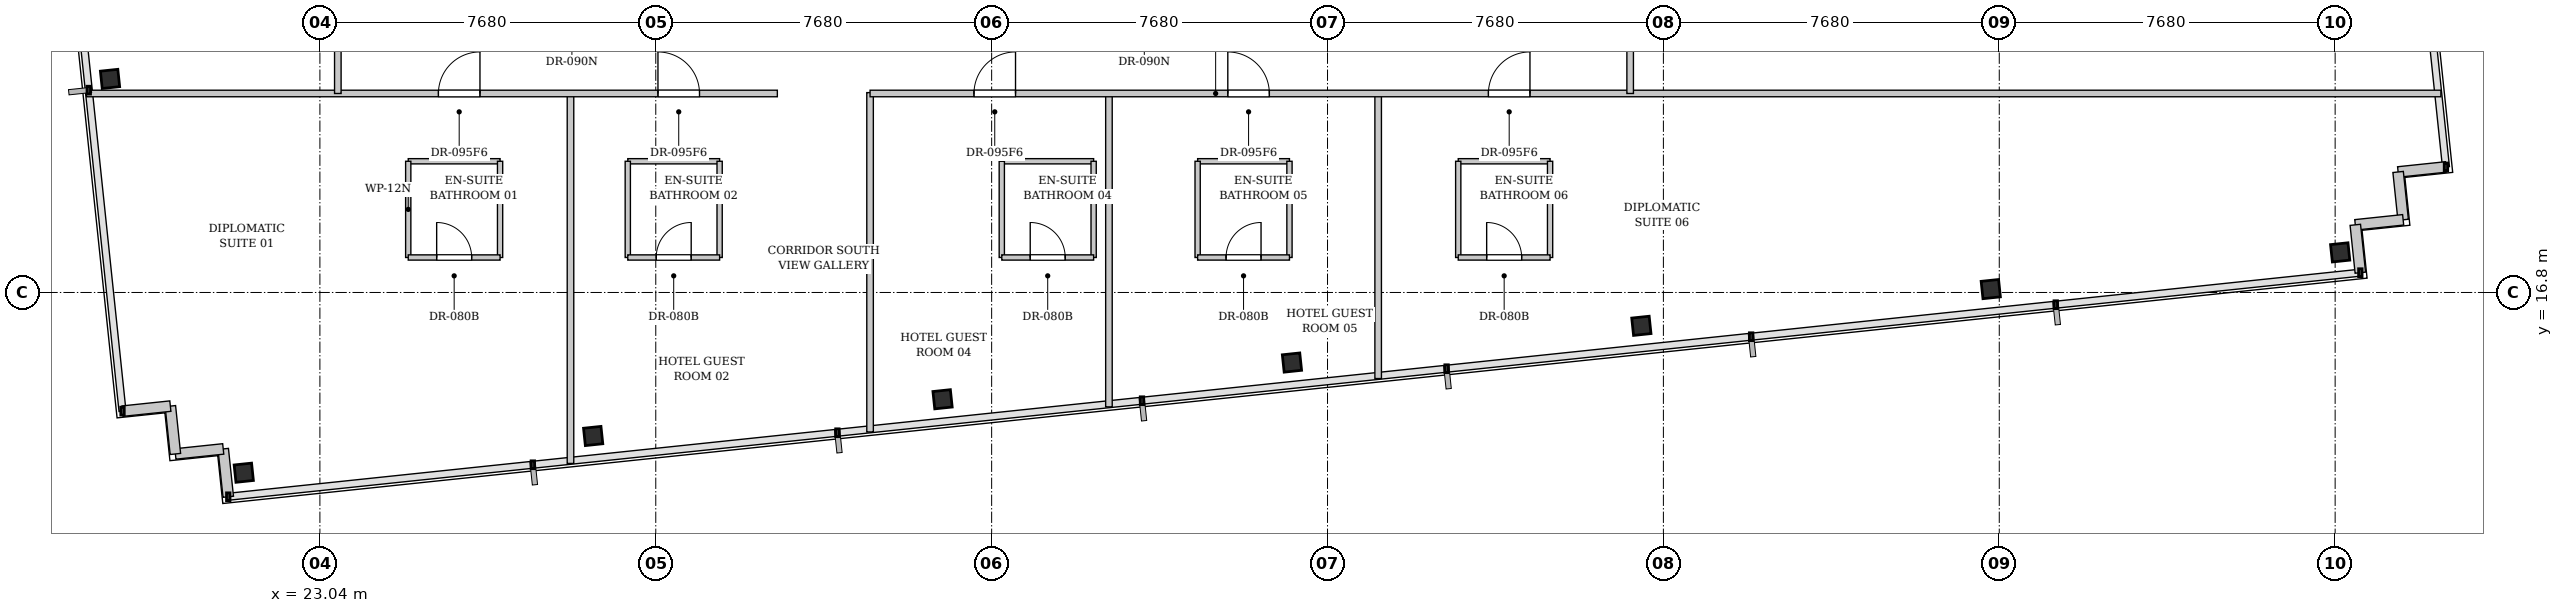
"""IFC4 building model, lengths in metres.
Left out: names, types, materials, properties, quantities, classifications, styles, units other than length and angle.
Written with IfcOpenShell. Run it as: python <this file> out.ifc"""

import sys

from ifc_helpers import new_model, si_unit, direction, frame, frame_2d, origin, origin_2d, place, context, subcontext, project, spatial, rectangle, i_section, extrude, element, fill, save


model = new_model("IFC4")
c1 = context("Model", 3, precision=1e-05, world=origin(), true_north=direction((0.0, 1.0)))
c2 = subcontext(c1, "Body", "Model", "MODEL_VIEW")
j1 = project(units=[si_unit("LENGTHUNIT", "METRE"), si_unit("PLANEANGLEUNIT", "RADIAN")], contexts=[c1])
p1 = place(None, origin())
s1 = spatial("IfcSite", under=j1, at=p1, CompositionType="ELEMENT")
p2 = place(p1, origin())
s2 = spatial("IfcBuilding", under=s1, at=p2, CompositionType="ELEMENT")
p3 = place(p2, frame((0.0, 0.0, 227.6)))
s3 = spatial("IfcBuildingStorey", under=s2, at=p3, CompositionType="ELEMENT", Elevation=227.6)
for number, where, z_axis, x_axis in (
    (1, (21.299, 12.678, 0.0), (0.0, 0.0, 1.0), (0.995, 0.105, 0.0)),
    (2, (29.288, 13.518, 0.0), (0.0, 0.0, 1.0), (0.995, 0.105, 0.0)),
    (3, (37.278, 14.358, 0.0), (0.0, 0.0, 1.0), (0.995, 0.105, 0.0)),
    (4, (45.267, 15.198, 0.0), (0.0, 0.0, 1.0), (0.995, 0.105, 0.0)),
    (5, (53.256, 16.037, 0.0), (0.0, 0.0, 1.0), (0.995, 0.105, 0.0)),
    (6, (61.246, 16.877, 0.0), (0.0, 0.0, 1.0), (0.995, 0.105, 0.0)),
    (7, (69.235, 17.717, 0.0), (0.0, 0.0, 1.0), (0.995, 0.105, 0.0)),
    (8, (18.241, 21.683, 0.0), (0.0, 0.0, 1.0), (0.995, 0.105, 0.0)),
):
    element("IfcColumn", number, at=place(p3, frame(where, z_axis=z_axis, x_axis=x_axis)), inside=s3, PredefinedType="COLUMN", context=c2, shape_type="SweptSolid", body=[
        extrude(i_section(OverallWidth=0.401, OverallDepth=0.399, WebThickness=0.025, FlangeThickness=0.04, FilletRadius=0.015, at=origin_2d()), origin(), (0.0, 0.0, 1.0), 3.3),
    ])
for number, where, z_axis, x_axis in (
    (9, (20.945, 12.128, 0.0), (0.0, 0.0, 1.0), (-0.105, 0.995, 0.0)),
    (10, (20.83, 13.222, 0.0), (0.0, 0.0, 1.0), (-0.995, -0.105, 0.0)),
    (11, (19.736, 13.107, 0.0), (0.0, 0.0, 1.0), (-0.105, 0.995, 0.0)),
    (12, (19.621, 14.201, 0.0), (0.0, 0.0, 1.0), (-0.995, -0.105, 0.0)),
    (13, (71.654, 19.67, 0.0), (0.0, 0.0, 1.0), (-0.995, -0.105, 0.0)),
    (14, (70.56, 19.555, 0.0), (0.0, 0.0, 1.0), (0.105, -0.995, 0.0)),
    (15, (70.675, 18.461, 0.0), (0.0, 0.0, 1.0), (-0.995, -0.105, 0.0)),
    (16, (69.581, 18.346, 0.0), (0.0, 0.0, 1.0), (0.105, -0.995, 0.0)),
):
    element("IfcWall", number, at=place(p3, frame(where, z_axis=z_axis, x_axis=x_axis)), inside=s3, PredefinedType="SOLIDWALL", context=c2, shape_type="SweptSolid", body=[
        extrude(rectangle(XDim=1.1, YDim=0.24, at=frame_2d((0.55, 0.0))), origin(), (0.0, 0.0, 1.0), 3.08),
    ])
p4 = place(p3, frame((25.06, 19.8, 0.0), z_axis=(0.0, 0.0, 1.0), x_axis=(1.0, 0.0, 0.0)))
e17 = element("IfcWall", 17, at=p4, inside=s3, PredefinedType="PARTITIONING", context=c2, shape_type="SweptSolid", body=[
    extrude(rectangle(XDim=2.1, YDim=0.12, at=frame_2d((1.05, 0.0))), origin(), (0.0, 0.0, 1.0), 2.715),
])
for number, where, z_axis, x_axis in (
    (18, (25.06, 17.6, 0.0), (0.0, 0.0, 1.0), (0.0, 1.0, 0.0)),
    (19, (27.16, 17.6, 0.0), (0.0, 0.0, 1.0), (0.0, 1.0, 0.0)),
):
    element("IfcWall", number, at=place(p3, frame(where, z_axis=z_axis, x_axis=x_axis)), inside=s3, PredefinedType="PARTITIONING", context=c2, shape_type="SweptSolid", body=[
        extrude(rectangle(XDim=2.2, YDim=0.12, at=frame_2d((1.1, 0.0))), origin(), (0.0, 0.0, 1.0), 3.08),
    ])
p5 = place(p3, frame((25.06, 17.6, 0.0), z_axis=(0.0, 0.0, 1.0), x_axis=(1.0, 0.0, 0.0)))
e20 = element("IfcWall", 20, at=p5, inside=s3, PredefinedType="PARTITIONING", context=c2, shape_type="SweptSolid", body=[
    extrude(rectangle(XDim=2.1, YDim=0.12, at=frame_2d((1.05, 0.0))), origin(), (0.0, 0.0, 1.0), 3.08),
])
p6 = place(p5, frame((0.65, 0.0, 0.0)))
e21 = element("IfcOpeningElement", 21, at=p6, cuts=e20, PredefinedType="OPENING", context=c2, shape_type="SweptSolid", body=[
    extrude(rectangle(XDim=0.8, YDim=2.1, at=frame_2d((0.4, 1.05))), frame((0.0, 0.07, 0.0), z_axis=(0.0, -1.0, 0.0), x_axis=(1.0, 0.0, 0.0)), (0.0, 0.0, 1.0), 0.14),
])
p7 = place(p3, frame((30.08, 19.8, 0.0), z_axis=(0.0, 0.0, 1.0), x_axis=(1.0, 0.0, 0.0)))
e22 = element("IfcWall", 22, at=p7, inside=s3, PredefinedType="PARTITIONING", context=c2, shape_type="SweptSolid", body=[
    extrude(rectangle(XDim=2.1, YDim=0.12, at=frame_2d((1.05, 0.0))), origin(), (0.0, 0.0, 1.0), 2.715),
])
p8 = place(p3, frame((30.08, 17.6, 0.0), z_axis=(0.0, 0.0, 1.0), x_axis=(0.0, 1.0, 0.0)))
e23 = element("IfcWall", 23, at=p8, inside=s3, PredefinedType="PARTITIONING", context=c2, shape_type="SweptSolid", body=[
    extrude(rectangle(XDim=2.2, YDim=0.12, at=frame_2d((1.1, 0.0))), origin(), (0.0, 0.0, 1.0), 2.313),
])
p9 = place(p3, frame((32.18, 17.6, 0.0), z_axis=(0.0, 0.0, 1.0), x_axis=(0.0, 1.0, 0.0)))
e24 = element("IfcWall", 24, at=p9, inside=s3, PredefinedType="PARTITIONING", context=c2, shape_type="SweptSolid", body=[
    extrude(rectangle(XDim=2.2, YDim=0.12, at=frame_2d((1.1, 0.0))), origin(), (0.0, 0.0, 1.0), 3.08),
])
p10 = place(p3, frame((30.08, 17.6, 0.0), z_axis=(0.0, 0.0, 1.0), x_axis=(1.0, 0.0, 0.0)))
e25 = element("IfcWall", 25, at=p10, inside=s3, PredefinedType="PARTITIONING", context=c2, shape_type="SweptSolid", body=[
    extrude(rectangle(XDim=2.1, YDim=0.12, at=frame_2d((1.05, 0.0))), origin(), (0.0, 0.0, 1.0), 3.08),
])
p11 = place(p10, frame((0.65, 0.0, 0.0)))
e26 = element("IfcOpeningElement", 26, at=p11, cuts=e25, PredefinedType="OPENING", context=c2, shape_type="SweptSolid", body=[
    extrude(rectangle(XDim=0.8, YDim=2.1, at=frame_2d((0.4, 1.05))), frame((0.0, 0.07, 0.0), z_axis=(0.0, -1.0, 0.0), x_axis=(1.0, 0.0, 0.0)), (0.0, 0.0, 1.0), 0.14),
])
p12 = place(p3, frame((28.77, 12.891, 0.0), z_axis=(0.0, 0.0, 1.0), x_axis=(0.0, 1.0, 0.0)))
e27 = element("IfcWall", 27, at=p12, inside=s3, PredefinedType="PARTITIONING", context=c2, shape_type="SweptSolid", body=[
    extrude(rectangle(XDim=8.479, YDim=0.15, at=frame_2d((4.24, 0.0))), origin(), (0.0, 0.0, 1.0), 3.08),
])
p13 = place(p3, frame((38.632, 19.8, 0.0), z_axis=(0.0, 0.0, 1.0), x_axis=(1.0, 0.0, 0.0)))
e28 = element("IfcWall", 28, at=p13, inside=s3, PredefinedType="PARTITIONING", context=c2, shape_type="SweptSolid", body=[
    extrude(rectangle(XDim=2.1, YDim=0.12, at=frame_2d((1.05, 0.0))), origin(), (0.0, 0.0, 1.0), 2.715),
])
for number, where, z_axis, x_axis in (
    (29, (38.632, 17.6, 0.0), (0.0, 0.0, 1.0), (0.0, 1.0, 0.0)),
    (30, (40.732, 17.6, 0.0), (0.0, 0.0, 1.0), (0.0, 1.0, 0.0)),
):
    element("IfcWall", number, at=place(p3, frame(where, z_axis=z_axis, x_axis=x_axis)), inside=s3, PredefinedType="PARTITIONING", context=c2, shape_type="SweptSolid", body=[
        extrude(rectangle(XDim=2.2, YDim=0.12, at=frame_2d((1.1, 0.0))), origin(), (0.0, 0.0, 1.0), 3.08),
    ])
p14 = place(p3, frame((38.632, 17.6, 0.0), z_axis=(0.0, 0.0, 1.0), x_axis=(1.0, 0.0, 0.0)))
e31 = element("IfcWall", 31, at=p14, inside=s3, PredefinedType="PARTITIONING", context=c2, shape_type="SweptSolid", body=[
    extrude(rectangle(XDim=2.1, YDim=0.12, at=frame_2d((1.05, 0.0))), origin(), (0.0, 0.0, 1.0), 3.08),
])
p15 = place(p14, frame((0.65, 0.0, 0.0)))
e32 = element("IfcOpeningElement", 32, at=p15, cuts=e31, PredefinedType="OPENING", context=c2, shape_type="SweptSolid", body=[
    extrude(rectangle(XDim=0.8, YDim=2.1, at=frame_2d((0.4, 1.05))), frame((0.0, 0.07, 0.0), z_axis=(0.0, -1.0, 0.0), x_axis=(1.0, 0.0, 0.0)), (0.0, 0.0, 1.0), 0.14),
])
p16 = place(p3, frame((35.62, 13.611, 0.0), z_axis=(0.0, 0.0, 1.0), x_axis=(0.0, 1.0, 0.0)))
e33 = element("IfcWall", 33, at=p16, inside=s3, PredefinedType="PARTITIONING", context=c2, shape_type="SweptSolid", body=[
    extrude(rectangle(XDim=7.76, YDim=0.15, at=frame_2d((3.88, 0.0))), origin(), (0.0, 0.0, 1.0), 3.08),
])
p17 = place(p3, frame((43.11, 19.8, 0.0), z_axis=(0.0, 0.0, 1.0), x_axis=(1.0, 0.0, 0.0)))
e34 = element("IfcWall", 34, at=p17, inside=s3, PredefinedType="PARTITIONING", context=c2, shape_type="SweptSolid", body=[
    extrude(rectangle(XDim=2.1, YDim=0.12, at=frame_2d((1.05, 0.0))), origin(), (0.0, 0.0, 1.0), 2.715),
])
for number, where, z_axis, x_axis in (
    (35, (43.11, 17.6, 0.0), (0.0, 0.0, 1.0), (0.0, 1.0, 0.0)),
    (36, (45.21, 17.6, 0.0), (0.0, 0.0, 1.0), (0.0, 1.0, 0.0)),
):
    element("IfcWall", number, at=place(p3, frame(where, z_axis=z_axis, x_axis=x_axis)), inside=s3, PredefinedType="PARTITIONING", context=c2, shape_type="SweptSolid", body=[
        extrude(rectangle(XDim=2.2, YDim=0.12, at=frame_2d((1.1, 0.0))), origin(), (0.0, 0.0, 1.0), 3.08),
    ])
p18 = place(p3, frame((43.11, 17.6, 0.0), z_axis=(0.0, 0.0, 1.0), x_axis=(1.0, 0.0, 0.0)))
e37 = element("IfcWall", 37, at=p18, inside=s3, PredefinedType="PARTITIONING", context=c2, shape_type="SweptSolid", body=[
    extrude(rectangle(XDim=2.1, YDim=0.12, at=frame_2d((1.05, 0.0))), origin(), (0.0, 0.0, 1.0), 3.08),
])
p19 = place(p18, frame((0.65, 0.0, 0.0)))
e38 = element("IfcOpeningElement", 38, at=p19, cuts=e37, PredefinedType="OPENING", context=c2, shape_type="SweptSolid", body=[
    extrude(rectangle(XDim=0.8, YDim=2.1, at=frame_2d((0.4, 1.05))), frame((0.0, 0.07, 0.0), z_axis=(0.0, -1.0, 0.0), x_axis=(1.0, 0.0, 0.0)), (0.0, 0.0, 1.0), 0.14),
])
p20 = place(p3, frame((41.082, 14.185, 0.0), z_axis=(0.0, 0.0, 1.0), x_axis=(0.0, 1.0, 0.0)))
e39 = element("IfcWall", 39, at=p20, inside=s3, PredefinedType="PARTITIONING", context=c2, shape_type="SweptSolid", body=[
    extrude(rectangle(XDim=7.186, YDim=0.15, at=frame_2d((3.593, 0.0))), origin(), (0.0, 0.0, 1.0), 3.08),
])
p21 = place(p3, frame((49.069, 19.8, 0.0), z_axis=(0.0, 0.0, 1.0), x_axis=(1.0, 0.0, 0.0)))
e40 = element("IfcWall", 40, at=p21, inside=s3, PredefinedType="PARTITIONING", context=c2, shape_type="SweptSolid", body=[
    extrude(rectangle(XDim=2.1, YDim=0.12, at=frame_2d((1.05, 0.0))), origin(), (0.0, 0.0, 1.0), 2.715),
])
for number, where, z_axis, x_axis in (
    (41, (49.069, 17.6, 0.0), (0.0, 0.0, 1.0), (0.0, 1.0, 0.0)),
    (42, (51.169, 17.6, 0.0), (0.0, 0.0, 1.0), (0.0, 1.0, 0.0)),
):
    element("IfcWall", number, at=place(p3, frame(where, z_axis=z_axis, x_axis=x_axis)), inside=s3, PredefinedType="PARTITIONING", context=c2, shape_type="SweptSolid", body=[
        extrude(rectangle(XDim=2.2, YDim=0.12, at=frame_2d((1.1, 0.0))), origin(), (0.0, 0.0, 1.0), 3.08),
    ])
p22 = place(p3, frame((49.069, 17.6, 0.0), z_axis=(0.0, 0.0, 1.0), x_axis=(1.0, 0.0, 0.0)))
e43 = element("IfcWall", 43, at=p22, inside=s3, PredefinedType="PARTITIONING", context=c2, shape_type="SweptSolid", body=[
    extrude(rectangle(XDim=2.1, YDim=0.12, at=frame_2d((1.05, 0.0))), origin(), (0.0, 0.0, 1.0), 3.08),
])
p23 = place(p22, frame((0.65, 0.0, 0.0)))
e44 = element("IfcOpeningElement", 44, at=p23, cuts=e43, PredefinedType="OPENING", context=c2, shape_type="SweptSolid", body=[
    extrude(rectangle(XDim=0.8, YDim=2.1, at=frame_2d((0.4, 1.05))), frame((0.0, 0.07, 0.0), z_axis=(0.0, -1.0, 0.0), x_axis=(1.0, 0.0, 0.0)), (0.0, 0.0, 1.0), 0.14),
])
p24 = place(p3, frame((47.238, 14.832, 0.0), z_axis=(0.0, 0.0, 1.0), x_axis=(0.0, 1.0, 0.0)))
e45 = element("IfcWall", 45, at=p24, inside=s3, PredefinedType="PARTITIONING", context=c2, shape_type="SweptSolid", body=[
    extrude(rectangle(XDim=6.538, YDim=0.15, at=frame_2d((3.269, 0.0))), origin(), (0.0, 0.0, 1.0), 3.08),
])
p25 = place(p3, frame((17.703, 21.35, 0.0), z_axis=(0.0, 0.0, 1.0), x_axis=(1.0, 0.0, 0.0)))
e46 = element("IfcWall", 46, at=p25, inside=s3, PredefinedType="PARTITIONING", context=c2, shape_type="SweptSolid", body=[
    extrude(rectangle(XDim=15.797, YDim=0.15, at=frame_2d((7.898, 0.0))), origin(), (0.0, 0.0, 1.0), 3.08),
])
p26 = place(p25, frame((8.047, 0.0, 0.0)))
e47 = element("IfcOpeningElement", 47, at=p26, cuts=e46, PredefinedType="OPENING", context=c2, shape_type="SweptSolid", body=[
    extrude(rectangle(XDim=0.95, YDim=2.15, at=frame_2d((0.475, 1.075))), frame((0.0, 0.085, 0.0), z_axis=(0.0, -1.0, 0.0), x_axis=(1.0, 0.0, 0.0)), (0.0, 0.0, 1.0), 0.17),
])
p27 = place(p25, frame((13.067, 0.0, 0.0)))
e48 = element("IfcOpeningElement", 48, at=p27, cuts=e46, PredefinedType="OPENING", context=c2, shape_type="SweptSolid", body=[
    extrude(rectangle(XDim=0.95, YDim=2.15, at=frame_2d((0.475, 1.075))), frame((0.0, 0.085, 0.0), z_axis=(0.0, -1.0, 0.0), x_axis=(1.0, 0.0, 0.0)), (0.0, 0.0, 1.0), 0.17),
])
p28 = place(p3, frame((35.62, 21.35, 0.0), z_axis=(0.0, 0.0, 1.0), x_axis=(1.0, 0.0, 0.0)))
e49 = element("IfcWall", 49, at=p28, inside=s3, PredefinedType="PARTITIONING", context=c2, shape_type="SweptSolid", body=[
    extrude(rectangle(XDim=35.918, YDim=0.15, at=frame_2d((17.959, 0.0))), origin(), (0.0, 0.0, 1.0), 3.08),
])
p29 = place(p28, frame((2.376, 0.0, 0.0)))
e50 = element("IfcOpeningElement", 50, at=p29, cuts=e49, PredefinedType="OPENING", context=c2, shape_type="SweptSolid", body=[
    extrude(rectangle(XDim=0.95, YDim=2.15, at=frame_2d((0.475, 1.075))), frame((0.0, 0.085, 0.0), z_axis=(0.0, -1.0, 0.0), x_axis=(1.0, 0.0, 0.0)), (0.0, 0.0, 1.0), 0.17),
])
p30 = place(p28, frame((8.18, 0.0, 0.0)))
e51 = element("IfcOpeningElement", 51, at=p30, cuts=e49, PredefinedType="OPENING", context=c2, shape_type="SweptSolid", body=[
    extrude(rectangle(XDim=0.95, YDim=2.15, at=frame_2d((0.475, 1.075))), frame((0.0, 0.085, 0.0), z_axis=(0.0, -1.0, 0.0), x_axis=(1.0, 0.0, 0.0)), (0.0, 0.0, 1.0), 0.17),
])
p31 = place(p28, frame((14.139, 0.0, 0.0)))
e52 = element("IfcOpeningElement", 52, at=p31, cuts=e49, PredefinedType="OPENING", context=c2, shape_type="SweptSolid", body=[
    extrude(rectangle(XDim=0.95, YDim=2.15, at=frame_2d((0.475, 1.075))), frame((0.0, 0.085, 0.0), z_axis=(0.0, -1.0, 0.0), x_axis=(1.0, 0.0, 0.0)), (0.0, 0.0, 1.0), 0.17),
])
p32 = place(p3, frame((23.45, 21.35, 0.0), z_axis=(0.0, 0.0, 1.0), x_axis=(0.0, 1.0, 0.0)))
e53 = element("IfcWall", 53, at=p32, inside=s3, PredefinedType="PARTITIONING", context=c2, shape_type="SweptSolid", body=[
    extrude(rectangle(XDim=13.79, YDim=0.15, at=frame_2d((6.895, 0.0))), origin(), (0.0, 0.0, 1.0), 3.08),
])
p33 = place(p32, frame((1.03, 0.0, 0.0)))
e54 = element("IfcOpeningElement", 54, at=p33, cuts=e53, PredefinedType="OPENING", context=c2, shape_type="SweptSolid", body=[
    extrude(rectangle(XDim=0.9, YDim=2.15, at=frame_2d((0.45, 1.075))), frame((0.0, 0.085, 0.0), z_axis=(0.0, -1.0, 0.0), x_axis=(1.0, 0.0, 0.0)), (0.0, 0.0, 1.0), 0.17),
])
p34 = place(p3, frame((53.0, 21.35, 0.0), z_axis=(0.0, 0.0, 1.0), x_axis=(0.0, 1.0, 0.0)))
e55 = element("IfcWall", 55, at=p34, inside=s3, PredefinedType="PARTITIONING", context=c2, shape_type="SweptSolid", body=[
    extrude(rectangle(XDim=13.79, YDim=0.15, at=frame_2d((6.895, 0.0))), origin(), (0.0, 0.0, 1.0), 3.08),
])
p35 = place(p34, frame((1.03, 0.0, 0.0)))
e56 = element("IfcOpeningElement", 56, at=p35, cuts=e55, PredefinedType="OPENING", context=c2, shape_type="SweptSolid", body=[
    extrude(rectangle(XDim=0.9, YDim=2.15, at=frame_2d((0.45, 1.075))), frame((0.0, 0.085, 0.0), z_axis=(0.0, -1.0, 0.0), x_axis=(1.0, 0.0, 0.0)), (0.0, 0.0, 1.0), 0.17),
])
p36 = place(p6, origin())
e57 = element("IfcDoor", 57, at=p36, inside=s3, OperationType="SINGLE_SWING_LEFT", PredefinedType="DOOR", context=c2, shape_type="SweptSolid", body=[
    extrude(rectangle(XDim=0.8, YDim=2.1, at=frame_2d((0.4, 1.05))), frame((0.0, 0.025, 0.0), z_axis=(0.0, -1.0, 0.0), x_axis=(1.0, 0.0, 0.0)), (0.0, 0.0, 1.0), 0.05),
])
fill(e21, e57)
p37 = place(p11, origin())
e58 = element("IfcDoor", 58, at=p37, inside=s3, OperationType="SINGLE_SWING_RIGHT", PredefinedType="DOOR", context=c2, shape_type="SweptSolid", body=[
    extrude(rectangle(XDim=0.8, YDim=2.1, at=frame_2d((0.4, 1.05))), frame((0.0, 0.025, 0.0), z_axis=(0.0, -1.0, 0.0), x_axis=(1.0, 0.0, 0.0)), (0.0, 0.0, 1.0), 0.05),
])
fill(e26, e58)
p38 = place(p15, origin())
e59 = element("IfcDoor", 59, at=p38, inside=s3, OperationType="SINGLE_SWING_LEFT", PredefinedType="DOOR", context=c2, shape_type="SweptSolid", body=[
    extrude(rectangle(XDim=0.8, YDim=2.1, at=frame_2d((0.4, 1.05))), frame((0.0, 0.025, 0.0), z_axis=(0.0, -1.0, 0.0), x_axis=(1.0, 0.0, 0.0)), (0.0, 0.0, 1.0), 0.05),
])
fill(e32, e59)
p39 = place(p19, origin())
e60 = element("IfcDoor", 60, at=p39, inside=s3, OperationType="SINGLE_SWING_RIGHT", PredefinedType="DOOR", context=c2, shape_type="SweptSolid", body=[
    extrude(rectangle(XDim=0.8, YDim=2.1, at=frame_2d((0.4, 1.05))), frame((0.0, 0.025, 0.0), z_axis=(0.0, -1.0, 0.0), x_axis=(1.0, 0.0, 0.0)), (0.0, 0.0, 1.0), 0.05),
])
fill(e38, e60)
p40 = place(p23, origin())
e61 = element("IfcDoor", 61, at=p40, inside=s3, OperationType="SINGLE_SWING_LEFT", PredefinedType="DOOR", context=c2, shape_type="SweptSolid", body=[
    extrude(rectangle(XDim=0.8, YDim=2.1, at=frame_2d((0.4, 1.05))), frame((0.0, 0.025, 0.0), z_axis=(0.0, -1.0, 0.0), x_axis=(1.0, 0.0, 0.0)), (0.0, 0.0, 1.0), 0.05),
])
fill(e44, e61)
p41 = place(p26, origin())
e62 = element("IfcDoor", 62, at=p41, inside=s3, OperationType="SINGLE_SWING_RIGHT", PredefinedType="DOOR", context=c2, shape_type="SweptSolid", body=[
    extrude(rectangle(XDim=0.95, YDim=2.15, at=frame_2d((0.475, 1.075))), frame((0.0, 0.025, 0.0), z_axis=(0.0, -1.0, 0.0), x_axis=(1.0, 0.0, 0.0)), (0.0, 0.0, 1.0), 0.05),
])
fill(e47, e62)
p42 = place(p27, origin())
e63 = element("IfcDoor", 63, at=p42, inside=s3, OperationType="SINGLE_SWING_LEFT", PredefinedType="DOOR", context=c2, shape_type="SweptSolid", body=[
    extrude(rectangle(XDim=0.95, YDim=2.15, at=frame_2d((0.475, 1.075))), frame((0.0, 0.025, 0.0), z_axis=(0.0, -1.0, 0.0), x_axis=(1.0, 0.0, 0.0)), (0.0, 0.0, 1.0), 0.05),
])
fill(e48, e63)
p43 = place(p29, origin())
e64 = element("IfcDoor", 64, at=p43, inside=s3, OperationType="SINGLE_SWING_RIGHT", PredefinedType="DOOR", context=c2, shape_type="SweptSolid", body=[
    extrude(rectangle(XDim=0.95, YDim=2.15, at=frame_2d((0.475, 1.075))), frame((0.0, 0.025, 0.0), z_axis=(0.0, -1.0, 0.0), x_axis=(1.0, 0.0, 0.0)), (0.0, 0.0, 1.0), 0.05),
])
fill(e50, e64)
p44 = place(p30, origin())
e65 = element("IfcDoor", 65, at=p44, inside=s3, OperationType="SINGLE_SWING_LEFT", PredefinedType="DOOR", context=c2, shape_type="SweptSolid", body=[
    extrude(rectangle(XDim=0.95, YDim=2.15, at=frame_2d((0.475, 1.075))), frame((0.0, 0.025, 0.0), z_axis=(0.0, -1.0, 0.0), x_axis=(1.0, 0.0, 0.0)), (0.0, 0.0, 1.0), 0.05),
])
fill(e51, e65)
p45 = place(p31, origin())
e66 = element("IfcDoor", 66, at=p45, inside=s3, OperationType="SINGLE_SWING_RIGHT", PredefinedType="DOOR", context=c2, shape_type="SweptSolid", body=[
    extrude(rectangle(XDim=0.95, YDim=2.15, at=frame_2d((0.475, 1.075))), frame((0.0, 0.025, 0.0), z_axis=(0.0, -1.0, 0.0), x_axis=(1.0, 0.0, 0.0)), (0.0, 0.0, 1.0), 0.05),
])
fill(e52, e66)
save(model, sys.argv[1])
